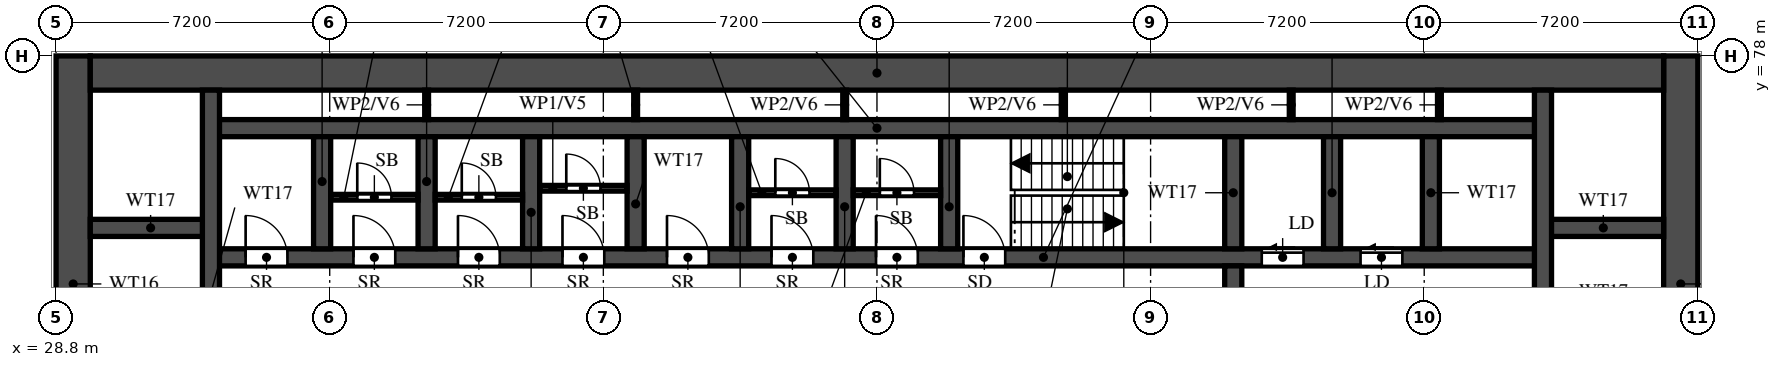
"""IFC4 building model, lengths in metres.
Left out: names, types, materials, properties, quantities, classifications, styles, units other than length and angle.
Written with IfcOpenShell. Run it as: python <this file> out.ifc"""

import sys

from ifc_helpers import new_model, si_unit, direction, frame, frame_2d, origin, place, context, subcontext, project, spatial, rectangle, extrude, element, fill, save


model = new_model("IFC4")
c1 = context("Model", 3, precision=1e-05, world=origin(), true_north=direction((0.0, 1.0)))
c2 = subcontext(c1, "Body", "Model", "MODEL_VIEW")
j1 = project(units=[si_unit("LENGTHUNIT", "METRE"), si_unit("PLANEANGLEUNIT", "RADIAN")], contexts=[c1])
p1 = place(None, origin())
s1 = spatial("IfcSite", under=j1, at=p1, CompositionType="ELEMENT")
p2 = place(p1, origin())
s2 = spatial("IfcBuilding", under=s1, at=p2, CompositionType="ELEMENT")
p3 = place(p2, frame((0.0, 0.0, 13.2)))
s3 = spatial("IfcBuildingStorey", under=s2, at=p3, CompositionType="ELEMENT", Elevation=13.2)
for number, where, z_axis, x_axis in (
    (1, (29.25, 66.0, 0.0), (0.0, 0.0, 1.0), (0.0, 1.0, 0.0)),
    (2, (71.55, 66.0, 0.0), (0.0, 0.0, 1.0), (0.0, 1.0, 0.0)),
):
    element("IfcWall", number, at=place(p3, frame(where, z_axis=z_axis, x_axis=x_axis)), inside=s3, PredefinedType="SHEAR", context=c2, shape_type="SweptSolid", body=[
        extrude(rectangle(XDim=12.0, YDim=0.9, at=frame_2d((6.0, 0.0))), origin(), (0.0, 0.0, 1.0), 3.8),
    ])
p4 = place(p3, frame((29.7, 77.55, 0.0), z_axis=(0.0, 0.0, 1.0), x_axis=(1.0, 0.0, 0.0)))
e3 = element("IfcWall", 3, at=p4, inside=s3, PredefinedType="SHEAR", context=c2, shape_type="SweptSolid", body=[
    extrude(rectangle(XDim=41.4, YDim=0.9, at=frame_2d((20.7, 0.0))), origin(), (0.0, 0.0, 1.0), 3.8),
])
p5 = place(p3, frame((32.875, 72.7, 0.0), z_axis=(0.0, 0.0, 1.0), x_axis=(1.0, 0.0, 0.0)))
e4 = element("IfcWall", 4, at=p5, inside=s3, PredefinedType="SHEAR", context=c2, shape_type="SweptSolid", body=[
    extrude(rectangle(XDim=35.05, YDim=0.45, at=frame_2d((17.525, 0.0))), origin(), (0.0, 0.0, 1.0), 3.8),
])
p6 = place(p5, frame((19.8, 0.0, 0.0)))
e5 = element("IfcOpeningElement", 5, at=p6, cuts=e4, PredefinedType="OPENING", context=c2, shape_type="SweptSolid", body=[
    extrude(rectangle(XDim=1.1, YDim=2.1, at=frame_2d((0.55, 1.05))), frame((0.0, 0.235, 0.0), z_axis=(0.0, -1.0, 0.0), x_axis=(1.0, 0.0, 0.0)), (0.0, 0.0, 1.0), 0.47),
])
p7 = place(p5, frame((27.65, 0.0, 0.0)))
e6 = element("IfcOpeningElement", 6, at=p7, cuts=e4, PredefinedType="OPENING", context=c2, shape_type="SweptSolid", body=[
    extrude(rectangle(XDim=1.1, YDim=2.1, at=frame_2d((0.55, 1.05))), frame((0.0, 0.235, 0.0), z_axis=(0.0, -1.0, 0.0), x_axis=(1.0, 0.0, 0.0)), (0.0, 0.0, 1.0), 0.47),
])
p8 = place(p5, frame((30.25, 0.0, 0.0)))
e7 = element("IfcOpeningElement", 7, at=p8, cuts=e4, PredefinedType="OPENING", context=c2, shape_type="SweptSolid", body=[
    extrude(rectangle(XDim=1.1, YDim=2.1, at=frame_2d((0.55, 1.05))), frame((0.0, 0.235, 0.0), z_axis=(0.0, -1.0, 0.0), x_axis=(1.0, 0.0, 0.0)), (0.0, 0.0, 1.0), 0.47),
])
p9 = place(p5, frame((3.75, 0.0, 0.0)))
e8 = element("IfcOpeningElement", 8, at=p9, cuts=e4, PredefinedType="OPENING", context=c2, shape_type="SweptSolid", body=[
    extrude(rectangle(XDim=1.1, YDim=2.1, at=frame_2d((0.55, 1.05))), frame((0.0, 0.235, 0.0), z_axis=(0.0, -1.0, 0.0), x_axis=(1.0, 0.0, 0.0)), (0.0, 0.0, 1.0), 0.47),
])
p10 = place(p5, frame((6.5, 0.0, 0.0)))
e9 = element("IfcOpeningElement", 9, at=p10, cuts=e4, PredefinedType="OPENING", context=c2, shape_type="SweptSolid", body=[
    extrude(rectangle(XDim=1.1, YDim=2.1, at=frame_2d((0.55, 1.05))), frame((0.0, 0.235, 0.0), z_axis=(0.0, -1.0, 0.0), x_axis=(1.0, 0.0, 0.0)), (0.0, 0.0, 1.0), 0.47),
])
p11 = place(p5, frame((9.25, 0.0, 0.0)))
e10 = element("IfcOpeningElement", 10, at=p11, cuts=e4, PredefinedType="OPENING", context=c2, shape_type="SweptSolid", body=[
    extrude(rectangle(XDim=1.1, YDim=2.1, at=frame_2d((0.55, 1.05))), frame((0.0, 0.235, 0.0), z_axis=(0.0, -1.0, 0.0), x_axis=(1.0, 0.0, 0.0)), (0.0, 0.0, 1.0), 0.47),
])
p12 = place(p5, frame((12.0, 0.0, 0.0)))
e11 = element("IfcOpeningElement", 11, at=p12, cuts=e4, PredefinedType="OPENING", context=c2, shape_type="SweptSolid", body=[
    extrude(rectangle(XDim=1.1, YDim=2.1, at=frame_2d((0.55, 1.05))), frame((0.0, 0.235, 0.0), z_axis=(0.0, -1.0, 0.0), x_axis=(1.0, 0.0, 0.0)), (0.0, 0.0, 1.0), 0.47),
])
p13 = place(p5, frame((14.75, 0.0, 0.0)))
e12 = element("IfcOpeningElement", 12, at=p13, cuts=e4, PredefinedType="OPENING", context=c2, shape_type="SweptSolid", body=[
    extrude(rectangle(XDim=1.1, YDim=2.1, at=frame_2d((0.55, 1.05))), frame((0.0, 0.235, 0.0), z_axis=(0.0, -1.0, 0.0), x_axis=(1.0, 0.0, 0.0)), (0.0, 0.0, 1.0), 0.47),
])
p14 = place(p5, frame((17.5, 0.0, 0.0)))
e13 = element("IfcOpeningElement", 13, at=p14, cuts=e4, PredefinedType="OPENING", context=c2, shape_type="SweptSolid", body=[
    extrude(rectangle(XDim=1.1, YDim=2.1, at=frame_2d((0.55, 1.05))), frame((0.0, 0.235, 0.0), z_axis=(0.0, -1.0, 0.0), x_axis=(1.0, 0.0, 0.0)), (0.0, 0.0, 1.0), 0.47),
])
p15 = place(p5, frame((0.913, 0.0, 0.0)))
e14 = element("IfcOpeningElement", 14, at=p15, cuts=e4, PredefinedType="OPENING", context=c2, shape_type="SweptSolid", body=[
    extrude(rectangle(XDim=1.1, YDim=2.1, at=frame_2d((0.55, 1.05))), frame((0.0, 0.235, 0.0), z_axis=(0.0, -1.0, 0.0), x_axis=(1.0, 0.0, 0.0)), (0.0, 0.0, 1.0), 0.47),
])
p16 = place(p3, frame((32.875, 76.1, 0.0), z_axis=(0.0, 0.0, 1.0), x_axis=(1.0, 0.0, 0.0)))
e15 = element("IfcWall", 15, at=p16, inside=s3, PredefinedType="SHEAR", context=c2, shape_type="SweptSolid", body=[
    extrude(rectangle(XDim=35.05, YDim=0.45, at=frame_2d((17.525, 0.0))), origin(), (0.0, 0.0, 1.0), 3.8),
])
for number, where, z_axis, x_axis in (
    (16, (29.7, 73.475, 0.0), (0.0, 0.0, 1.0), (1.0, 0.0, 0.0)),
    (17, (67.925, 73.475, 0.0), (0.0, 0.0, 1.0), (1.0, 0.0, 0.0)),
):
    element("IfcWall", number, at=place(p3, frame(where, z_axis=z_axis, x_axis=x_axis)), inside=s3, PredefinedType="SHEAR", context=c2, shape_type="SweptSolid", body=[
        extrude(rectangle(XDim=3.175, YDim=0.45, at=frame_2d((1.587, 0.0))), origin(), (0.0, 0.0, 1.0), 3.8),
    ])
p17 = place(p3, frame((32.875, 66.45, 0.0), z_axis=(0.0, 0.0, 1.0), x_axis=(0.0, 1.0, 0.0)))
e18 = element("IfcWall", 18, at=p17, inside=s3, PredefinedType="SHEAR", context=c2, shape_type="SweptSolid", body=[
    extrude(rectangle(XDim=10.65, YDim=0.45, at=frame_2d((5.325, 0.0))), origin(), (0.0, 0.0, 1.0), 3.8),
])
p18 = place(p3, frame((67.925, 66.45, 0.0), z_axis=(0.0, 0.0, 1.0), x_axis=(0.0, 1.0, 0.0)))
e19 = element("IfcWall", 19, at=p18, inside=s3, PredefinedType="SHEAR", context=c2, shape_type="SweptSolid", body=[
    extrude(rectangle(XDim=10.65, YDim=0.45, at=frame_2d((5.325, 0.0))), origin(), (0.0, 0.0, 1.0), 3.8),
])
p19 = place(p18, frame((0.15, 0.0, 0.0)))
e20 = element("IfcOpeningElement", 20, at=p19, cuts=e19, PredefinedType="OPENING", context=c2, shape_type="SweptSolid", body=[
    extrude(rectangle(XDim=1.1, YDim=2.1, at=frame_2d((0.55, 1.05))), frame((0.0, 0.235, 0.0), z_axis=(0.0, -1.0, 0.0), x_axis=(1.0, 0.0, 0.0)), (0.0, 0.0, 1.0), 0.47),
])
p20 = place(p3, frame((59.775, 66.45, 0.0), z_axis=(0.0, 0.0, 1.0), x_axis=(0.0, 1.0, 0.0)))
e21 = element("IfcWall", 21, at=p20, inside=s3, PredefinedType="SHEAR", context=c2, shape_type="SweptSolid", body=[
    extrude(rectangle(XDim=6.025, YDim=0.45, at=frame_2d((3.013, 0.0))), origin(), (0.0, 0.0, 1.0), 3.8),
])
p21 = place(p20, frame((3.85, 0.0, 0.0)))
e22 = element("IfcOpeningElement", 22, at=p21, cuts=e21, PredefinedType="OPENING", context=c2, shape_type="SweptSolid", body=[
    extrude(rectangle(XDim=1.2, YDim=2.1, at=frame_2d((0.6, 1.05))), frame((0.0, 0.235, 0.0), z_axis=(0.0, -1.0, 0.0), x_axis=(1.0, 0.0, 0.0)), (0.0, 0.0, 1.0), 0.47),
])
for number, where, z_axis, x_axis in (
    (23, (59.775, 72.925, 0.0), (0.0, 0.0, 1.0), (0.0, 1.0, 0.0)),
    (24, (35.8, 72.925, 0.0), (0.0, 0.0, 1.0), (0.0, 1.0, 0.0)),
    (25, (38.55, 72.925, 0.0), (0.0, 0.0, 1.0), (0.0, 1.0, 0.0)),
    (26, (41.3, 72.925, 0.0), (0.0, 0.0, 1.0), (0.0, 1.0, 0.0)),
    (27, (44.05, 72.925, 0.0), (0.0, 0.0, 1.0), (0.0, 1.0, 0.0)),
    (28, (46.8, 72.925, 0.0), (0.0, 0.0, 1.0), (0.0, 1.0, 0.0)),
    (29, (49.55, 72.925, 0.0), (0.0, 0.0, 1.0), (0.0, 1.0, 0.0)),
    (30, (52.3, 72.925, 0.0), (0.0, 0.0, 1.0), (0.0, 1.0, 0.0)),
    (31, (62.375, 72.925, 0.0), (0.0, 0.0, 1.0), (0.0, 1.0, 0.0)),
    (32, (64.975, 72.925, 0.0), (0.0, 0.0, 1.0), (0.0, 1.0, 0.0)),
):
    element("IfcWall", number, at=place(p3, frame(where, z_axis=z_axis, x_axis=x_axis)), inside=s3, PredefinedType="SHEAR", context=c2, shape_type="SweptSolid", body=[
        extrude(rectangle(XDim=2.95, YDim=0.45, at=frame_2d((1.475, 0.0))), origin(), (0.0, 0.0, 1.0), 3.8),
    ])
p22 = place(p3, frame((36.025, 74.282, 0.0), z_axis=(0.0, 0.0, 1.0), x_axis=(1.0, 0.0, 0.0)))
e33 = element("IfcWall", 33, at=p22, inside=s3, PredefinedType="PARTITIONING", context=c2, shape_type="SweptSolid", body=[
    extrude(rectangle(XDim=2.3, YDim=0.15, at=frame_2d((1.15, 0.0))), origin(), (0.0, 0.0, 1.0), 3.8),
])
p23 = place(p22, frame((0.7, 0.0, 0.0)))
e34 = element("IfcOpeningElement", 34, at=p23, cuts=e33, PredefinedType="OPENING", context=c2, shape_type="SweptSolid", body=[
    extrude(rectangle(XDim=0.9, YDim=2.1, at=frame_2d((0.45, 1.05))), frame((0.0, 0.085, 0.0), z_axis=(0.0, -1.0, 0.0), x_axis=(1.0, 0.0, 0.0)), (0.0, 0.0, 1.0), 0.17),
])
p24 = place(p3, frame((38.775, 74.282, 0.0), z_axis=(0.0, 0.0, 1.0), x_axis=(1.0, 0.0, 0.0)))
e35 = element("IfcWall", 35, at=p24, inside=s3, PredefinedType="PARTITIONING", context=c2, shape_type="SweptSolid", body=[
    extrude(rectangle(XDim=2.3, YDim=0.15, at=frame_2d((1.15, 0.0))), origin(), (0.0, 0.0, 1.0), 3.8),
])
p25 = place(p24, frame((0.7, 0.0, 0.0)))
e36 = element("IfcOpeningElement", 36, at=p25, cuts=e35, PredefinedType="OPENING", context=c2, shape_type="SweptSolid", body=[
    extrude(rectangle(XDim=0.9, YDim=2.1, at=frame_2d((0.45, 1.05))), frame((0.0, 0.085, 0.0), z_axis=(0.0, -1.0, 0.0), x_axis=(1.0, 0.0, 0.0)), (0.0, 0.0, 1.0), 0.17),
])
p26 = place(p3, frame((41.525, 74.518, 0.0), z_axis=(0.0, 0.0, 1.0), x_axis=(1.0, 0.0, 0.0)))
e37 = element("IfcWall", 37, at=p26, inside=s3, PredefinedType="PARTITIONING", context=c2, shape_type="SweptSolid", body=[
    extrude(rectangle(XDim=2.3, YDim=0.15, at=frame_2d((1.15, 0.0))), origin(), (0.0, 0.0, 1.0), 3.8),
])
p27 = place(p26, frame((0.7, 0.0, 0.0)))
e38 = element("IfcOpeningElement", 38, at=p27, cuts=e37, PredefinedType="OPENING", context=c2, shape_type="SweptSolid", body=[
    extrude(rectangle(XDim=0.9, YDim=2.1, at=frame_2d((0.45, 1.05))), frame((0.0, 0.085, 0.0), z_axis=(0.0, -1.0, 0.0), x_axis=(1.0, 0.0, 0.0)), (0.0, 0.0, 1.0), 0.17),
])
p28 = place(p3, frame((47.025, 74.4, 0.0), z_axis=(0.0, 0.0, 1.0), x_axis=(1.0, 0.0, 0.0)))
e39 = element("IfcWall", 39, at=p28, inside=s3, PredefinedType="PARTITIONING", context=c2, shape_type="SweptSolid", body=[
    extrude(rectangle(XDim=2.3, YDim=0.15, at=frame_2d((1.15, 0.0))), origin(), (0.0, 0.0, 1.0), 3.8),
])
p29 = place(p28, frame((0.7, 0.0, 0.0)))
e40 = element("IfcOpeningElement", 40, at=p29, cuts=e39, PredefinedType="OPENING", context=c2, shape_type="SweptSolid", body=[
    extrude(rectangle(XDim=0.9, YDim=2.1, at=frame_2d((0.45, 1.05))), frame((0.0, 0.085, 0.0), z_axis=(0.0, -1.0, 0.0), x_axis=(1.0, 0.0, 0.0)), (0.0, 0.0, 1.0), 0.17),
])
p30 = place(p3, frame((49.775, 74.4, 0.0), z_axis=(0.0, 0.0, 1.0), x_axis=(1.0, 0.0, 0.0)))
e41 = element("IfcWall", 41, at=p30, inside=s3, PredefinedType="PARTITIONING", context=c2, shape_type="SweptSolid", body=[
    extrude(rectangle(XDim=2.3, YDim=0.15, at=frame_2d((1.15, 0.0))), origin(), (0.0, 0.0, 1.0), 3.8),
])
p31 = place(p30, frame((0.7, 0.0, 0.0)))
e42 = element("IfcOpeningElement", 42, at=p31, cuts=e41, PredefinedType="OPENING", context=c2, shape_type="SweptSolid", body=[
    extrude(rectangle(XDim=0.9, YDim=2.1, at=frame_2d((0.45, 1.05))), frame((0.0, 0.085, 0.0), z_axis=(0.0, -1.0, 0.0), x_axis=(1.0, 0.0, 0.0)), (0.0, 0.0, 1.0), 0.17),
])
for number, where, z_axis, x_axis in (
    (43, (38.55, 76.325, 0.0), (0.0, 0.0, 1.0), (0.0, 1.0, 0.0)),
    (44, (44.05, 76.325, 0.0), (0.0, 0.0, 1.0), (0.0, 1.0, 0.0)),
    (45, (49.55, 76.325, 0.0), (0.0, 0.0, 1.0), (0.0, 1.0, 0.0)),
    (46, (55.3, 76.325, 0.0), (0.0, 0.0, 1.0), (0.0, 1.0, 0.0)),
    (47, (61.3, 76.325, 0.0), (0.0, 0.0, 1.0), (0.0, 1.0, 0.0)),
    (48, (65.2, 76.325, 0.0), (0.0, 0.0, 1.0), (0.0, 1.0, 0.0)),
):
    element("IfcWall", number, at=place(p3, frame(where, z_axis=z_axis, x_axis=x_axis)), inside=s3, PredefinedType="PARTITIONING", context=c2, shape_type="SweptSolid", body=[
        extrude(rectangle(XDim=0.775, YDim=0.1, at=frame_2d((0.388, 0.0))), origin(), (0.0, 0.0, 1.0), 3.8),
    ])
p32 = place(p6, origin())
e49 = element("IfcDoor", 49, at=p32, inside=s3, OperationType="SINGLE_SWING_LEFT", PredefinedType="DOOR", context=c2, shape_type="SweptSolid", body=[
    extrude(rectangle(XDim=1.1, YDim=2.1, at=frame_2d((0.55, 1.05))), frame((0.0, 0.025, 0.0), z_axis=(0.0, -1.0, 0.0), x_axis=(1.0, 0.0, 0.0)), (0.0, 0.0, 1.0), 0.05),
])
fill(e5, e49)
p33 = place(p7, origin())
e50 = element("IfcDoor", 50, at=p33, inside=s3, OperationType="SLIDING_TO_LEFT", PredefinedType="DOOR", context=c2, shape_type="SweptSolid", body=[
    extrude(rectangle(XDim=1.1, YDim=2.1, at=frame_2d((0.55, 1.05))), frame((0.0, 0.025, 0.0), z_axis=(0.0, -1.0, 0.0), x_axis=(1.0, 0.0, 0.0)), (0.0, 0.0, 1.0), 0.05),
])
fill(e6, e50)
p34 = place(p8, origin())
e51 = element("IfcDoor", 51, at=p34, inside=s3, OperationType="SLIDING_TO_LEFT", PredefinedType="DOOR", context=c2, shape_type="SweptSolid", body=[
    extrude(rectangle(XDim=1.1, YDim=2.1, at=frame_2d((0.55, 1.05))), frame((0.0, 0.025, 0.0), z_axis=(0.0, -1.0, 0.0), x_axis=(1.0, 0.0, 0.0)), (0.0, 0.0, 1.0), 0.05),
])
fill(e7, e51)
p35 = place(p9, origin())
e52 = element("IfcDoor", 52, at=p35, inside=s3, OperationType="SINGLE_SWING_LEFT", PredefinedType="DOOR", context=c2, shape_type="SweptSolid", body=[
    extrude(rectangle(XDim=1.1, YDim=2.1, at=frame_2d((0.55, 1.05))), frame((0.0, 0.025, 0.0), z_axis=(0.0, -1.0, 0.0), x_axis=(1.0, 0.0, 0.0)), (0.0, 0.0, 1.0), 0.05),
])
fill(e8, e52)
p36 = place(p23, origin())
e53 = element("IfcDoor", 53, at=p36, inside=s3, OperationType="SINGLE_SWING_LEFT", PredefinedType="DOOR", context=c2, shape_type="SweptSolid", body=[
    extrude(rectangle(XDim=0.9, YDim=2.1, at=frame_2d((0.45, 1.05))), frame((0.0, 0.025, 0.0), z_axis=(0.0, -1.0, 0.0), x_axis=(1.0, 0.0, 0.0)), (0.0, 0.0, 1.0), 0.05),
])
fill(e34, e53)
p37 = place(p10, origin())
e54 = element("IfcDoor", 54, at=p37, inside=s3, OperationType="SINGLE_SWING_LEFT", PredefinedType="DOOR", context=c2, shape_type="SweptSolid", body=[
    extrude(rectangle(XDim=1.1, YDim=2.1, at=frame_2d((0.55, 1.05))), frame((0.0, 0.025, 0.0), z_axis=(0.0, -1.0, 0.0), x_axis=(1.0, 0.0, 0.0)), (0.0, 0.0, 1.0), 0.05),
])
fill(e9, e54)
p38 = place(p25, origin())
e55 = element("IfcDoor", 55, at=p38, inside=s3, OperationType="SINGLE_SWING_RIGHT", PredefinedType="DOOR", context=c2, shape_type="SweptSolid", body=[
    extrude(rectangle(XDim=0.9, YDim=2.1, at=frame_2d((0.45, 1.05))), frame((0.0, 0.025, 0.0), z_axis=(0.0, -1.0, 0.0), x_axis=(1.0, 0.0, 0.0)), (0.0, 0.0, 1.0), 0.05),
])
fill(e36, e55)
p39 = place(p11, origin())
e56 = element("IfcDoor", 56, at=p39, inside=s3, OperationType="SINGLE_SWING_LEFT", PredefinedType="DOOR", context=c2, shape_type="SweptSolid", body=[
    extrude(rectangle(XDim=1.1, YDim=2.1, at=frame_2d((0.55, 1.05))), frame((0.0, 0.025, 0.0), z_axis=(0.0, -1.0, 0.0), x_axis=(1.0, 0.0, 0.0)), (0.0, 0.0, 1.0), 0.05),
])
fill(e10, e56)
p40 = place(p27, origin())
e57 = element("IfcDoor", 57, at=p40, inside=s3, OperationType="SINGLE_SWING_RIGHT", PredefinedType="DOOR", context=c2, shape_type="SweptSolid", body=[
    extrude(rectangle(XDim=0.9, YDim=2.1, at=frame_2d((0.45, 1.05))), frame((0.0, 0.025, 0.0), z_axis=(0.0, -1.0, 0.0), x_axis=(1.0, 0.0, 0.0)), (0.0, 0.0, 1.0), 0.05),
])
fill(e38, e57)
p41 = place(p12, origin())
e58 = element("IfcDoor", 58, at=p41, inside=s3, OperationType="SINGLE_SWING_LEFT", PredefinedType="DOOR", context=c2, shape_type="SweptSolid", body=[
    extrude(rectangle(XDim=1.1, YDim=2.1, at=frame_2d((0.55, 1.05))), frame((0.0, 0.025, 0.0), z_axis=(0.0, -1.0, 0.0), x_axis=(1.0, 0.0, 0.0)), (0.0, 0.0, 1.0), 0.05),
])
fill(e11, e58)
p42 = place(p13, origin())
e59 = element("IfcDoor", 59, at=p42, inside=s3, OperationType="SINGLE_SWING_LEFT", PredefinedType="DOOR", context=c2, shape_type="SweptSolid", body=[
    extrude(rectangle(XDim=1.1, YDim=2.1, at=frame_2d((0.55, 1.05))), frame((0.0, 0.025, 0.0), z_axis=(0.0, -1.0, 0.0), x_axis=(1.0, 0.0, 0.0)), (0.0, 0.0, 1.0), 0.05),
])
fill(e12, e59)
p43 = place(p29, origin())
e60 = element("IfcDoor", 60, at=p43, inside=s3, OperationType="SINGLE_SWING_LEFT", PredefinedType="DOOR", context=c2, shape_type="SweptSolid", body=[
    extrude(rectangle(XDim=0.9, YDim=2.1, at=frame_2d((0.45, 1.05))), frame((0.0, 0.025, 0.0), z_axis=(0.0, -1.0, 0.0), x_axis=(1.0, 0.0, 0.0)), (0.0, 0.0, 1.0), 0.05),
])
fill(e40, e60)
p44 = place(p14, origin())
e61 = element("IfcDoor", 61, at=p44, inside=s3, OperationType="SINGLE_SWING_LEFT", PredefinedType="DOOR", context=c2, shape_type="SweptSolid", body=[
    extrude(rectangle(XDim=1.1, YDim=2.1, at=frame_2d((0.55, 1.05))), frame((0.0, 0.025, 0.0), z_axis=(0.0, -1.0, 0.0), x_axis=(1.0, 0.0, 0.0)), (0.0, 0.0, 1.0), 0.05),
])
fill(e13, e61)
p45 = place(p31, origin())
e62 = element("IfcDoor", 62, at=p45, inside=s3, OperationType="SINGLE_SWING_RIGHT", PredefinedType="DOOR", context=c2, shape_type="SweptSolid", body=[
    extrude(rectangle(XDim=0.9, YDim=2.1, at=frame_2d((0.45, 1.05))), frame((0.0, 0.025, 0.0), z_axis=(0.0, -1.0, 0.0), x_axis=(1.0, 0.0, 0.0)), (0.0, 0.0, 1.0), 0.05),
])
fill(e42, e62)
p46 = place(p15, origin())
e63 = element("IfcDoor", 63, at=p46, inside=s3, OperationType="SINGLE_SWING_LEFT", PredefinedType="DOOR", context=c2, shape_type="SweptSolid", body=[
    extrude(rectangle(XDim=1.1, YDim=2.1, at=frame_2d((0.55, 1.05))), frame((0.0, 0.025, 0.0), z_axis=(0.0, -1.0, 0.0), x_axis=(1.0, 0.0, 0.0)), (0.0, 0.0, 1.0), 0.05),
])
fill(e14, e63)
save(model, sys.argv[1])
